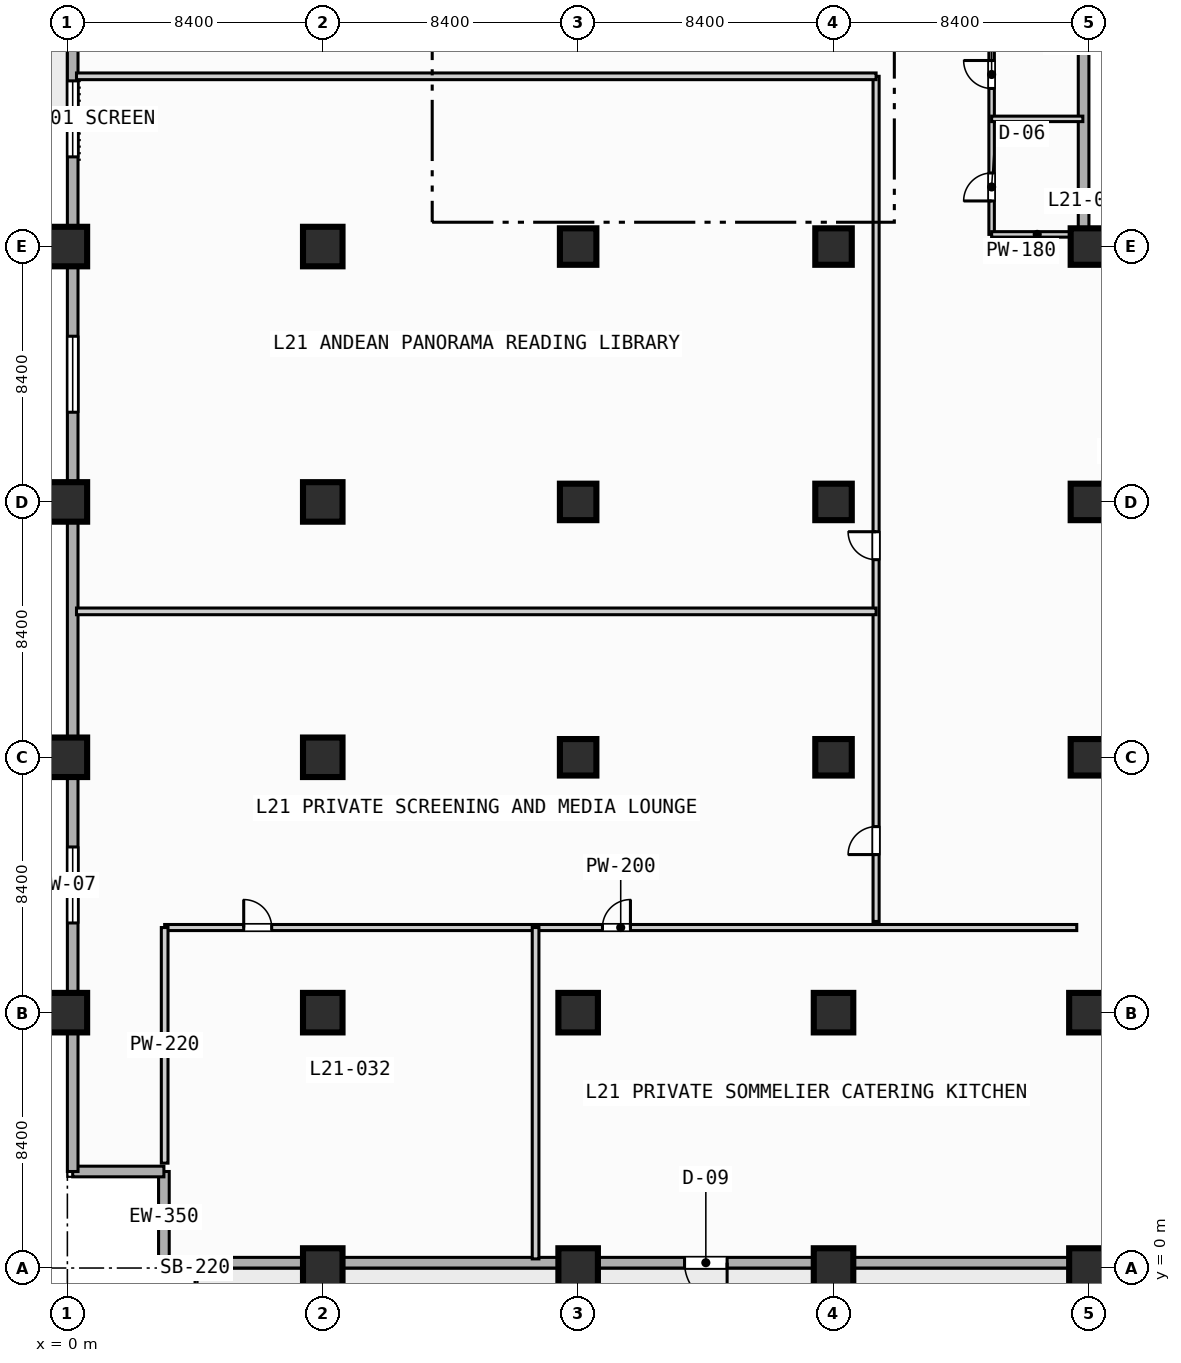
"""IFC4 building model, lengths in metres.
Left out: names, types, materials, properties, quantities, classifications, styles, units other than length and angle.
Written with IfcOpenShell. Run it as: python <this file> out.ifc"""

import sys

from ifc_helpers import new_model, si_unit, direction, frame, frame_2d, origin, origin_2d, place, context, subcontext, project, spatial, rectangle, extrude, element, fill, save


model = new_model("IFC4")
c1 = context("Model", 3, precision=1e-05, world=origin(), true_north=direction((0.0, 1.0)))
c2 = subcontext(c1, "Body", "Model", "MODEL_VIEW")
j1 = project(units=[si_unit("LENGTHUNIT", "METRE"), si_unit("PLANEANGLEUNIT", "RADIAN")], contexts=[c1])
p1 = place(None, origin())
s1 = spatial("IfcSite", under=j1, at=p1, CompositionType="ELEMENT")
p2 = place(p1, origin())
s2 = spatial("IfcBuilding", under=s1, at=p2, CompositionType="ELEMENT")
p3 = place(p2, frame((0.0, 0.0, 89.6)))
s3 = spatial("IfcBuildingStorey", under=s2, at=p3, CompositionType="ELEMENT", Elevation=89.6)
for number, where, z_axis, x_axis in (
    (1, (0.0, 8.4, 0.0), (0.0, 0.0, 1.0), (1.0, 0.0, 0.0)),
    (2, (0.0, 16.8, 0.0), (0.0, 0.0, 1.0), (1.0, 0.0, 0.0)),
    (3, (0.0, 25.2, 0.0), (0.0, 0.0, 1.0), (1.0, 0.0, 0.0)),
    (4, (0.0, 33.6, 0.0), (0.0, 0.0, 1.0), (1.0, 0.0, 0.0)),
    (5, (8.4, 0.0, 0.0), (0.0, 0.0, 1.0), (1.0, 0.0, 0.0)),
    (6, (8.4, 8.4, 0.0), (0.0, 0.0, 1.0), (1.0, 0.0, 0.0)),
    (7, (8.4, 16.8, 0.0), (0.0, 0.0, 1.0), (1.0, 0.0, 0.0)),
    (8, (8.4, 25.2, 0.0), (0.0, 0.0, 1.0), (1.0, 0.0, 0.0)),
    (9, (8.4, 33.6, 0.0), (0.0, 0.0, 1.0), (1.0, 0.0, 0.0)),
    (10, (16.8, 0.0, 0.0), (0.0, 0.0, 1.0), (1.0, 0.0, 0.0)),
    (11, (16.8, 8.4, 0.0), (0.0, 0.0, 1.0), (1.0, 0.0, 0.0)),
):
    element("IfcColumn", number, at=place(p3, frame(where, z_axis=z_axis, x_axis=x_axis)), inside=s3, PredefinedType="COLUMN", context=c2, shape_type="SweptSolid", body=[
        extrude(rectangle(XDim=1.3, YDim=1.3, at=origin_2d()), origin(), (0.0, 0.0, 1.0), 4.4),
    ])
for number, where, z_axis, x_axis in (
    (12, (16.8, 16.8, 0.0), (0.0, 0.0, 1.0), (1.0, 0.0, 0.0)),
    (13, (16.8, 25.2, 0.0), (0.0, 0.0, 1.0), (1.0, 0.0, 0.0)),
    (14, (16.8, 33.6, 0.0), (0.0, 0.0, 1.0), (1.0, 0.0, 0.0)),
):
    element("IfcColumn", number, at=place(p3, frame(where, z_axis=z_axis, x_axis=x_axis)), inside=s3, PredefinedType="COLUMN", context=c2, shape_type="SweptSolid", body=[
        extrude(rectangle(XDim=1.2, YDim=1.2, at=origin_2d()), origin(), (0.0, 0.0, 1.0), 4.4),
    ])
for number, where, z_axis, x_axis in (
    (15, (25.2, 0.0, 0.0), (0.0, 0.0, 1.0), (1.0, 0.0, 0.0)),
    (16, (25.2, 8.4, 0.0), (0.0, 0.0, 1.0), (1.0, 0.0, 0.0)),
):
    element("IfcColumn", number, at=place(p3, frame(where, z_axis=z_axis, x_axis=x_axis)), inside=s3, PredefinedType="COLUMN", context=c2, shape_type="SweptSolid", body=[
        extrude(rectangle(XDim=1.3, YDim=1.3, at=origin_2d()), origin(), (0.0, 0.0, 1.0), 4.4),
    ])
for number, where, z_axis, x_axis in (
    (17, (25.2, 16.8, 0.0), (0.0, 0.0, 1.0), (1.0, 0.0, 0.0)),
    (18, (25.2, 25.2, 0.0), (0.0, 0.0, 1.0), (1.0, 0.0, 0.0)),
    (19, (25.2, 33.6, 0.0), (0.0, 0.0, 1.0), (1.0, 0.0, 0.0)),
):
    element("IfcColumn", number, at=place(p3, frame(where, z_axis=z_axis, x_axis=x_axis)), inside=s3, PredefinedType="COLUMN", context=c2, shape_type="SweptSolid", body=[
        extrude(rectangle(XDim=1.2, YDim=1.2, at=origin_2d()), origin(), (0.0, 0.0, 1.0), 4.4),
    ])
for number, where, z_axis, x_axis in (
    (20, (33.6, 0.0, 0.0), (0.0, 0.0, 1.0), (1.0, 0.0, 0.0)),
    (21, (33.6, 8.4, 0.0), (0.0, 0.0, 1.0), (1.0, 0.0, 0.0)),
):
    element("IfcColumn", number, at=place(p3, frame(where, z_axis=z_axis, x_axis=x_axis)), inside=s3, PredefinedType="COLUMN", context=c2, shape_type="SweptSolid", body=[
        extrude(rectangle(XDim=1.3, YDim=1.3, at=origin_2d()), origin(), (0.0, 0.0, 1.0), 4.4),
    ])
for number, where, z_axis, x_axis in (
    (22, (33.6, 16.8, 0.0), (0.0, 0.0, 1.0), (1.0, 0.0, 0.0)),
    (23, (33.6, 25.2, 0.0), (0.0, 0.0, 1.0), (1.0, 0.0, 0.0)),
    (24, (33.6, 33.6, 0.0), (0.0, 0.0, 1.0), (1.0, 0.0, 0.0)),
):
    element("IfcColumn", number, at=place(p3, frame(where, z_axis=z_axis, x_axis=x_axis)), inside=s3, PredefinedType="COLUMN", context=c2, shape_type="SweptSolid", body=[
        extrude(rectangle(XDim=1.2, YDim=1.2, at=origin_2d()), origin(), (0.0, 0.0, 1.0), 4.4),
    ])
for number, where, z_axis, x_axis in (
    (25, (3.175, 0.175, 0.0), (0.0, 0.0, 1.0), (0.0, 1.0, 0.0)),
    (26, (3.175, 3.175, 0.0), (0.0, 0.0, 1.0), (-1.0, 0.0, 0.0)),
):
    element("IfcWall", number, at=place(p3, frame(where, z_axis=z_axis, x_axis=x_axis)), inside=s3, PredefinedType="STANDARD", context=c2, shape_type="SweptSolid", body=[
        extrude(rectangle(XDim=3.0, YDim=0.35, at=frame_2d((1.5, 0.0))), origin(), (0.0, 0.0, 1.0), 4.05),
    ])
p4 = place(p3, frame((0.175, 3.175, 0.0), z_axis=(0.0, 0.0, 1.0), x_axis=(0.0, 1.0, 0.0)))
e27 = element("IfcWall", 27, at=p4, inside=s3, PredefinedType="STANDARD", context=c2, shape_type="SweptSolid", body=[
    extrude(rectangle(XDim=86.05, YDim=0.35, at=frame_2d((43.025, 0.0))), origin(), (0.0, 0.0, 1.0), 4.05),
])
p5 = place(p4, frame((42.325, 0.0, 0.0)))
e28 = element("IfcOpeningElement", 28, at=p5, cuts=e27, PredefinedType="OPENING", context=c2, shape_type="SweptSolid", body=[
    extrude(rectangle(XDim=1.4, YDim=2.2, at=frame_2d((0.7, 1.1))), frame((0.0, 0.185, 0.0), z_axis=(0.0, -1.0, 0.0), x_axis=(1.0, 0.0, 0.0)), (0.0, 0.0, 1.0), 0.37),
])
p6 = place(p4, frame((8.175, 0.0, 0.85)))
e29 = element("IfcOpeningElement", 29, at=p6, cuts=e27, PredefinedType="OPENING", context=c2, shape_type="SweptSolid", body=[
    extrude(rectangle(XDim=2.5, YDim=2.2, at=frame_2d((1.25, 1.1))), frame((0.0, 0.185, 0.0), z_axis=(0.0, -1.0, 0.0), x_axis=(1.0, 0.0, 0.0)), (0.0, 0.0, 1.0), 0.37),
])
p7 = place(p4, frame((24.975, 0.0, 0.85)))
e30 = element("IfcOpeningElement", 30, at=p7, cuts=e27, PredefinedType="OPENING", context=c2, shape_type="SweptSolid", body=[
    extrude(rectangle(XDim=2.5, YDim=2.2, at=frame_2d((1.25, 1.1))), frame((0.0, 0.185, 0.0), z_axis=(0.0, -1.0, 0.0), x_axis=(1.0, 0.0, 0.0)), (0.0, 0.0, 1.0), 0.37),
])
p8 = place(p4, frame((33.375, 0.0, 0.85)))
e31 = element("IfcOpeningElement", 31, at=p8, cuts=e27, PredefinedType="OPENING", context=c2, shape_type="SweptSolid", body=[
    extrude(rectangle(XDim=2.5, YDim=2.2, at=frame_2d((1.25, 1.1))), frame((0.0, 0.185, 0.0), z_axis=(0.0, -1.0, 0.0), x_axis=(1.0, 0.0, 0.0)), (0.0, 0.0, 1.0), 0.37),
])
p9 = place(p3, frame((33.425, 89.225, 0.0), z_axis=(0.0, 0.0, 1.0), x_axis=(0.0, -1.0, 0.0)))
e32 = element("IfcWall", 32, at=p9, inside=s3, PredefinedType="STANDARD", context=c2, shape_type="SweptSolid", body=[
    extrude(rectangle(XDim=55.8, YDim=0.35, at=frame_2d((27.9, 0.0))), origin(), (0.0, 0.0, 1.0), 4.05),
])
p10 = place(p3, frame((33.425, 33.425, 0.0), z_axis=(0.0, 0.0, 1.0), x_axis=(1.0, 0.0, 0.0)))
e33 = element("IfcWall", 33, at=p10, inside=s3, PredefinedType="STANDARD", context=c2, shape_type="SweptSolid", body=[
    extrude(rectangle(XDim=39.0, YDim=0.35, at=frame_2d((19.5, 0.0))), origin(), (0.0, 0.0, 1.0), 4.05),
])
p11 = place(p10, frame((12.075, 0.0, 0.0)))
e34 = element("IfcOpeningElement", 34, at=p11, cuts=e33, PredefinedType="OPENING", context=c2, shape_type="SweptSolid", body=[
    extrude(rectangle(XDim=1.4, YDim=2.2, at=frame_2d((0.7, 1.1))), frame((0.0, 0.185, 0.0), z_axis=(0.0, -1.0, 0.0), x_axis=(1.0, 0.0, 0.0)), (0.0, 0.0, 1.0), 0.37),
])
p12 = place(p3, frame((72.425, 0.175, 0.0), z_axis=(0.0, 0.0, 1.0), x_axis=(-1.0, 0.0, 0.0)))
e35 = element("IfcWall", 35, at=p12, inside=s3, PredefinedType="STANDARD", context=c2, shape_type="SweptSolid", body=[
    extrude(rectangle(XDim=69.25, YDim=0.35, at=frame_2d((34.625, 0.0))), origin(), (0.0, 0.0, 1.0), 4.05),
])
p13 = place(p12, frame((50.725, 0.0, 0.0)))
e36 = element("IfcOpeningElement", 36, at=p13, cuts=e35, PredefinedType="OPENING", context=c2, shape_type="SweptSolid", body=[
    extrude(rectangle(XDim=1.4, YDim=2.2, at=frame_2d((0.7, 1.1))), frame((0.0, 0.185, 0.0), z_axis=(0.0, -1.0, 0.0), x_axis=(1.0, 0.0, 0.0)), (0.0, 0.0, 1.0), 0.37),
])
p14 = place(p12, frame((8.175, 0.0, 0.85)))
e37 = element("IfcOpeningElement", 37, at=p14, cuts=e35, PredefinedType="OPENING", context=c2, shape_type="SweptSolid", body=[
    extrude(rectangle(XDim=2.5, YDim=2.2, at=frame_2d((1.25, 1.1))), frame((0.0, 0.185, 0.0), z_axis=(0.0, -1.0, 0.0), x_axis=(1.0, 0.0, 0.0)), (0.0, 0.0, 1.0), 0.37),
])
p15 = place(p3, frame((30.4, 34.0, 0.0), z_axis=(0.0, 0.0, 1.0), x_axis=(0.0, 1.0, 0.0)))
e38 = element("IfcWall", 38, at=p15, inside=s3, PredefinedType="PLUMBINGWALL", context=c2, shape_type="SweptSolid", body=[
    extrude(rectangle(XDim=7.6, YDim=0.18, at=frame_2d((3.8, 0.0))), origin(), (0.0, 0.0, 1.0), 4.05),
])
p16 = place(p15, frame((1.1, 0.0, 0.0)))
e39 = element("IfcOpeningElement", 39, at=p16, cuts=e38, PredefinedType="OPENING", context=c2, shape_type="SweptSolid", body=[
    extrude(rectangle(XDim=0.92, YDim=2.1, at=frame_2d((0.46, 1.05))), frame((0.0, 0.1, 0.0), z_axis=(0.0, -1.0, 0.0), x_axis=(1.0, 0.0, 0.0)), (0.0, 0.0, 1.0), 0.2),
])
p17 = place(p15, frame((4.8, 0.0, 0.0)))
e40 = element("IfcOpeningElement", 40, at=p17, cuts=e38, PredefinedType="OPENING", context=c2, shape_type="SweptSolid", body=[
    extrude(rectangle(XDim=0.92, YDim=2.1, at=frame_2d((0.46, 1.05))), frame((0.0, 0.1, 0.0), z_axis=(0.0, -1.0, 0.0), x_axis=(1.0, 0.0, 0.0)), (0.0, 0.0, 1.0), 0.2),
])
for number, where, z_axis, x_axis in (
    (41, (30.4, 34.0, 0.0), (0.0, 0.0, 1.0), (1.0, 0.0, 0.0)),
    (42, (30.4, 37.8, 0.0), (0.0, 0.0, 1.0), (1.0, 0.0, 0.0)),
):
    element("IfcWall", number, at=place(p3, frame(where, z_axis=z_axis, x_axis=x_axis)), inside=s3, PredefinedType="PLUMBINGWALL", context=c2, shape_type="SweptSolid", body=[
        extrude(rectangle(XDim=3.0, YDim=0.18, at=frame_2d((1.5, 0.0))), origin(), (0.0, 0.0, 1.0), 4.05),
    ])
p18 = place(p3, frame((3.2, 11.2, 0.0), z_axis=(0.0, 0.0, 1.0), x_axis=(1.0, 0.0, 0.0)))
e43 = element("IfcWall", 43, at=p18, inside=s3, PredefinedType="PARTITIONING", context=c2, shape_type="SweptSolid", body=[
    extrude(rectangle(XDim=30.0, YDim=0.2, at=frame_2d((15.0, 0.0))), origin(), (0.0, 0.0, 1.0), 4.05),
])
p19 = place(p18, frame((2.6, 0.0, 0.0)))
e44 = element("IfcOpeningElement", 44, at=p19, cuts=e43, PredefinedType="OPENING", context=c2, shape_type="SweptSolid", body=[
    extrude(rectangle(XDim=0.92, YDim=2.1, at=frame_2d((0.46, 1.05))), frame((0.0, 0.11, 0.0), z_axis=(0.0, -1.0, 0.0), x_axis=(1.0, 0.0, 0.0)), (0.0, 0.0, 1.0), 0.22),
])
p20 = place(p18, frame((14.4, 0.0, 0.0)))
e45 = element("IfcOpeningElement", 45, at=p20, cuts=e43, PredefinedType="OPENING", context=c2, shape_type="SweptSolid", body=[
    extrude(rectangle(XDim=0.92, YDim=2.1, at=frame_2d((0.46, 1.05))), frame((0.0, 0.11, 0.0), z_axis=(0.0, -1.0, 0.0), x_axis=(1.0, 0.0, 0.0)), (0.0, 0.0, 1.0), 0.22),
])
p21 = place(p3, frame((3.2, 3.45, 0.0), z_axis=(0.0, 0.0, 1.0), x_axis=(0.0, 1.0, 0.0)))
e46 = element("IfcWall", 46, at=p21, inside=s3, PredefinedType="PARTITIONING", context=c2, shape_type="SweptSolid", body=[
    extrude(rectangle(XDim=7.75, YDim=0.22, at=frame_2d((3.875, 0.0))), origin(), (0.0, 0.0, 1.0), 4.05),
])
p22 = place(p3, frame((15.4, 0.3, 0.0), z_axis=(0.0, 0.0, 1.0), x_axis=(0.0, 1.0, 0.0)))
e47 = element("IfcWall", 47, at=p22, inside=s3, PredefinedType="PARTITIONING", context=c2, shape_type="SweptSolid", body=[
    extrude(rectangle(XDim=10.9, YDim=0.22, at=frame_2d((5.45, 0.0))), origin(), (0.0, 0.0, 1.0), 4.05),
])
p23 = place(p3, frame((26.6, 11.4, 0.0), z_axis=(0.0, 0.0, 1.0), x_axis=(0.0, 1.0, 0.0)))
e48 = element("IfcWall", 48, at=p23, inside=s3, PredefinedType="PARTITIONING", context=c2, shape_type="SweptSolid", body=[
    extrude(rectangle(XDim=27.8, YDim=0.2, at=frame_2d((13.9, 0.0))), origin(), (0.0, 0.0, 1.0), 4.05),
])
p24 = place(p23, frame((2.2, 0.0, 0.0)))
e49 = element("IfcOpeningElement", 49, at=p24, cuts=e48, PredefinedType="OPENING", context=c2, shape_type="SweptSolid", body=[
    extrude(rectangle(XDim=0.92, YDim=2.1, at=frame_2d((0.46, 1.05))), frame((0.0, 0.11, 0.0), z_axis=(0.0, -1.0, 0.0), x_axis=(1.0, 0.0, 0.0)), (0.0, 0.0, 1.0), 0.22),
])
p25 = place(p23, frame((11.9, 0.0, 0.0)))
e50 = element("IfcOpeningElement", 50, at=p25, cuts=e48, PredefinedType="OPENING", context=c2, shape_type="SweptSolid", body=[
    extrude(rectangle(XDim=0.92, YDim=2.1, at=frame_2d((0.46, 1.05))), frame((0.0, 0.11, 0.0), z_axis=(0.0, -1.0, 0.0), x_axis=(1.0, 0.0, 0.0)), (0.0, 0.0, 1.0), 0.22),
])
for number, where, z_axis, x_axis in (
    (51, (0.3, 21.6, 0.0), (0.0, 0.0, 1.0), (1.0, 0.0, 0.0)),
    (52, (0.3, 39.2, 0.0), (0.0, 0.0, 1.0), (1.0, 0.0, 0.0)),
):
    element("IfcWall", number, at=place(p3, frame(where, z_axis=z_axis, x_axis=x_axis)), inside=s3, PredefinedType="PARTITIONING", context=c2, shape_type="SweptSolid", body=[
        extrude(rectangle(XDim=26.3, YDim=0.22, at=frame_2d((13.15, 0.0))), origin(), (0.0, 0.0, 1.0), 4.05),
    ])
p26 = place(p6, origin())
e53 = element("IfcWindow", 53, at=p26, inside=s3, PartitioningType="SINGLE_PANEL", PredefinedType="WINDOW", context=c2, shape_type="SweptSolid", body=[
    extrude(rectangle(XDim=2.5, YDim=2.2, at=frame_2d((1.25, 1.1))), frame((0.0, 0.03, 0.0), z_axis=(0.0, -1.0, 0.0), x_axis=(1.0, 0.0, 0.0)), (0.0, 0.0, 1.0), 0.06),
])
fill(e29, e53)
p27 = place(p7, origin())
e54 = element("IfcWindow", 54, at=p27, inside=s3, PartitioningType="SINGLE_PANEL", PredefinedType="WINDOW", context=c2, shape_type="SweptSolid", body=[
    extrude(rectangle(XDim=2.5, YDim=2.2, at=frame_2d((1.25, 1.1))), frame((0.0, 0.03, 0.0), z_axis=(0.0, -1.0, 0.0), x_axis=(1.0, 0.0, 0.0)), (0.0, 0.0, 1.0), 0.06),
])
fill(e30, e54)
p28 = place(p8, origin())
e55 = element("IfcWindow", 55, at=p28, inside=s3, PartitioningType="SINGLE_PANEL", PredefinedType="WINDOW", context=c2, shape_type="SweptSolid", body=[
    extrude(rectangle(XDim=2.5, YDim=2.2, at=frame_2d((1.25, 1.1))), frame((0.0, 0.03, 0.0), z_axis=(0.0, -1.0, 0.0), x_axis=(1.0, 0.0, 0.0)), (0.0, 0.0, 1.0), 0.06),
])
fill(e31, e55)
p29 = place(p13, origin())
e56 = element("IfcDoor", 56, at=p29, inside=s3, OperationType="SINGLE_SWING_LEFT", PredefinedType="DOOR", context=c2, shape_type="SweptSolid", body=[
    extrude(rectangle(XDim=1.4, YDim=2.2, at=frame_2d((0.7, 1.1))), frame((0.0, 0.025, 0.0), z_axis=(0.0, -1.0, 0.0), x_axis=(1.0, 0.0, 0.0)), (0.0, 0.0, 1.0), 0.05),
])
fill(e36, e56)
p30 = place(p16, origin())
e57 = element("IfcDoor", 57, at=p30, inside=s3, OperationType="SINGLE_SWING_LEFT", PredefinedType="DOOR", context=c2, shape_type="SweptSolid", body=[
    extrude(rectangle(XDim=0.92, YDim=2.1, at=frame_2d((0.46, 1.05))), frame((0.0, 0.025, 0.0), z_axis=(0.0, -1.0, 0.0), x_axis=(1.0, 0.0, 0.0)), (0.0, 0.0, 1.0), 0.05),
])
fill(e39, e57)
p31 = place(p17, origin())
e58 = element("IfcDoor", 58, at=p31, inside=s3, OperationType="SINGLE_SWING_RIGHT", PredefinedType="DOOR", context=c2, shape_type="SweptSolid", body=[
    extrude(rectangle(XDim=0.92, YDim=2.1, at=frame_2d((0.46, 1.05))), frame((0.0, 0.025, 0.0), z_axis=(0.0, -1.0, 0.0), x_axis=(1.0, 0.0, 0.0)), (0.0, 0.0, 1.0), 0.05),
])
fill(e40, e58)
p32 = place(p19, origin())
e59 = element("IfcDoor", 59, at=p32, inside=s3, OperationType="SINGLE_SWING_LEFT", PredefinedType="DOOR", context=c2, shape_type="SweptSolid", body=[
    extrude(rectangle(XDim=0.92, YDim=2.1, at=frame_2d((0.46, 1.05))), frame((0.0, 0.025, 0.0), z_axis=(0.0, -1.0, 0.0), x_axis=(1.0, 0.0, 0.0)), (0.0, 0.0, 1.0), 0.05),
])
fill(e44, e59)
p33 = place(p20, origin())
e60 = element("IfcDoor", 60, at=p33, inside=s3, OperationType="SINGLE_SWING_RIGHT", PredefinedType="DOOR", context=c2, shape_type="SweptSolid", body=[
    extrude(rectangle(XDim=0.92, YDim=2.1, at=frame_2d((0.46, 1.05))), frame((0.0, 0.025, 0.0), z_axis=(0.0, -1.0, 0.0), x_axis=(1.0, 0.0, 0.0)), (0.0, 0.0, 1.0), 0.05),
])
fill(e45, e60)
p34 = place(p24, origin())
e61 = element("IfcDoor", 61, at=p34, inside=s3, OperationType="SINGLE_SWING_LEFT", PredefinedType="DOOR", context=c2, shape_type="SweptSolid", body=[
    extrude(rectangle(XDim=0.92, YDim=2.1, at=frame_2d((0.46, 1.05))), frame((0.0, 0.025, 0.0), z_axis=(0.0, -1.0, 0.0), x_axis=(1.0, 0.0, 0.0)), (0.0, 0.0, 1.0), 0.05),
])
fill(e49, e61)
p35 = place(p25, origin())
e62 = element("IfcDoor", 62, at=p35, inside=s3, OperationType="SINGLE_SWING_RIGHT", PredefinedType="DOOR", context=c2, shape_type="SweptSolid", body=[
    extrude(rectangle(XDim=0.92, YDim=2.1, at=frame_2d((0.46, 1.05))), frame((0.0, 0.025, 0.0), z_axis=(0.0, -1.0, 0.0), x_axis=(1.0, 0.0, 0.0)), (0.0, 0.0, 1.0), 0.05),
])
fill(e50, e62)
save(model, sys.argv[1])
